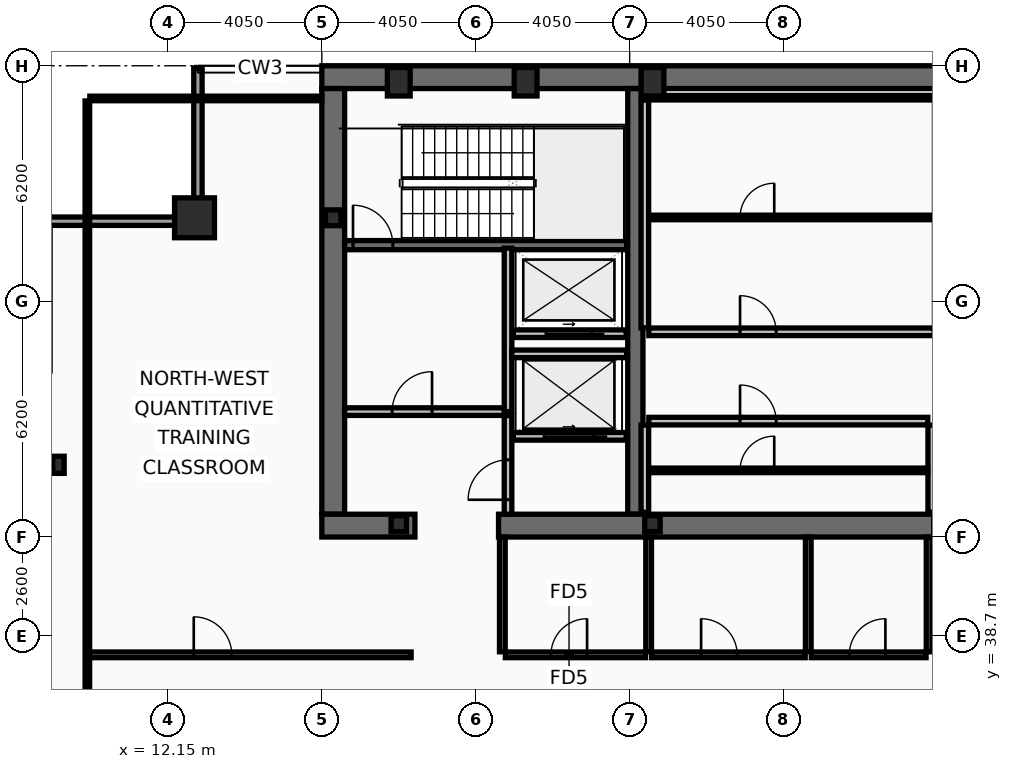
"""IFC4 building model, lengths in metres.
Left out: names, types, materials, properties, quantities, classifications, styles, units other than length and angle.
Written with IfcOpenShell. Run it as: python <this file> out.ifc"""

import sys

from ifc_helpers import new_model, si_unit, direction, frame, frame_2d, origin, origin_2d, place, context, subcontext, project, spatial, rectangle, hollow_rectangle, i_section, extrude, element, fill, save


model = new_model("IFC4")
c1 = context("Model", 3, precision=1e-05, world=origin(), true_north=direction((0.0, 1.0)))
c2 = subcontext(c1, "Body", "Model", "MODEL_VIEW")
j1 = project(units=[si_unit("LENGTHUNIT", "METRE"), si_unit("PLANEANGLEUNIT", "RADIAN")], contexts=[c1])
p1 = place(None, origin())
s1 = spatial("IfcSite", under=j1, at=p1, CompositionType="ELEMENT")
p2 = place(p1, origin())
s2 = spatial("IfcBuilding", under=s1, at=p2, CompositionType="ELEMENT")
p3 = place(p2, frame((0.0, 0.0, 265.4)))
s3 = spatial("IfcBuildingStorey", under=s2, at=p3, CompositionType="ELEMENT", Elevation=265.4)
p4 = place(p3, frame((16.2, 53.4, 0.0), z_axis=(0.0, 0.0, 1.0), x_axis=(1.0, 0.0, 0.0)))
e1 = element("IfcWall", 1, at=p4, inside=s3, PredefinedType="SHEAR", context=c2, shape_type="SweptSolid", body=[
    extrude(rectangle(XDim=40.5, YDim=0.6, at=frame_2d((20.25, 0.0))), origin(), (0.0, 0.0, 1.0), 4.24),
])
p5 = place(p3, frame((16.5, 41.9, 0.0), z_axis=(0.0, 0.0, 1.0), x_axis=(0.0, 1.0, 0.0)))
e2 = element("IfcWall", 2, at=p5, inside=s3, PredefinedType="SHEAR", context=c2, shape_type="SweptSolid", body=[
    extrude(rectangle(XDim=11.2, YDim=0.6, at=frame_2d((5.6, 0.0))), origin(), (0.0, 0.0, 1.0), 4.24),
])
p6 = place(p3, frame((24.45, 41.9, 0.0), z_axis=(0.0, 0.0, 1.0), x_axis=(0.0, 1.0, 0.0)))
e3 = element("IfcWall", 3, at=p6, inside=s3, PredefinedType="SHEAR", context=c2, shape_type="SweptSolid", body=[
    extrude(rectangle(XDim=11.2, YDim=0.4, at=frame_2d((5.6, 0.0))), origin(), (0.0, 0.0, 1.0), 4.24),
])
p7 = place(p3, frame((18.65, 41.6, 0.0), z_axis=(0.0, 0.0, 1.0), x_axis=(-1.0, 0.0, 0.0)))
e4 = element("IfcWall", 4, at=p7, inside=s3, PredefinedType="SHEAR", context=c2, shape_type="SweptSolid", body=[
    extrude(rectangle(XDim=2.45, YDim=0.6, at=frame_2d((1.225, 0.0))), origin(), (0.0, 0.0, 1.0), 4.24),
])
p8 = place(p3, frame((32.3, 41.6, 0.0), z_axis=(0.0, 0.0, 1.0), x_axis=(-1.0, 0.0, 0.0)))
e5 = element("IfcWall", 5, at=p8, inside=s3, PredefinedType="SHEAR", context=c2, shape_type="SweptSolid", body=[
    extrude(rectangle(XDim=11.45, YDim=0.6, at=frame_2d((5.725, 0.0))), origin(), (0.0, 0.0, 1.0), 4.24),
])
p9 = place(p3, frame((16.8, 48.98, 0.0), z_axis=(0.0, 0.0, 1.0), x_axis=(1.0, 0.0, 0.0)))
e6 = element("IfcWall", 6, at=p9, inside=s3, PredefinedType="SHEAR", context=c2, shape_type="SweptSolid", body=[
    extrude(rectangle(XDim=7.42, YDim=0.24, at=frame_2d((3.71, 0.0))), origin(), (0.0, 0.0, 1.0), 4.24),
])
p10 = place(p9, frame((0.22, 0.0, 0.0)))
e7 = element("IfcOpeningElement", 7, at=p10, cuts=e6, PredefinedType="OPENING", context=c2, shape_type="SweptSolid", body=[
    extrude(rectangle(XDim=1.05, YDim=2.15, at=frame_2d((0.525, 1.075))), frame((0.0, 0.13, 0.0), z_axis=(0.0, -1.0, 0.0), x_axis=(1.0, 0.0, 0.0)), (0.0, 0.0, 1.0), 0.26),
])
p11 = place(p3, frame((12.85, 49.7, 0.0), z_axis=(0.0, 0.0, 1.0), x_axis=(1.0, 0.0, 0.0)))
e8 = element("IfcColumn", 8, at=p11, inside=s3, PredefinedType="COLUMN", context=c2, shape_type="SweptSolid", body=[
    extrude(hollow_rectangle(XDim=1.05, YDim=1.05, WallThickness=0.055, at=origin_2d()), origin(), (0.0, 0.0, 1.0), 4.4),
])
for number, where, z_axis, x_axis in (
    (9, (18.225, 53.28, 0.0), (0.0, 0.0, 1.0), (1.0, 0.0, 0.0)),
    (10, (21.562, 53.28, 0.0), (0.0, 0.0, 1.0), (1.0, 0.0, 0.0)),
    (11, (24.9, 53.28, 0.0), (0.0, 0.0, 1.0), (1.0, 0.0, 0.0)),
):
    element("IfcColumn", number, at=place(p3, frame(where, z_axis=z_axis, x_axis=x_axis)), inside=s3, PredefinedType="COLUMN", context=c2, shape_type="SweptSolid", body=[
        extrude(hollow_rectangle(XDim=0.6, YDim=0.75, WallThickness=0.045, at=origin_2d()), origin(), (0.0, 0.0, 1.0), 4.4),
    ])
p12 = place(p3, frame((9.27, 43.2, 0.0), z_axis=(0.0, 0.0, 1.0), x_axis=(1.0, 0.0, 0.0)))
e12 = element("IfcColumn", 12, at=p12, inside=s3, PredefinedType="COLUMN", context=c2, shape_type="SweptSolid", body=[
    extrude(i_section(OverallWidth=0.3, OverallDepth=0.45, WebThickness=0.014, FlangeThickness=0.026, at=origin_2d()), origin(), (0.0, 0.0, 1.0), 4.4),
])
for number, where, z_axis, x_axis in (
    (13, (16.5, 49.7, 0.0), (0.0, 0.0, 1.0), (1.0, 0.0, 0.0)),
    (14, (18.225, 41.65, 0.0), (0.0, 0.0, 1.0), (1.0, 0.0, 0.0)),
    (15, (24.9, 41.65, 0.0), (0.0, 0.0, 1.0), (1.0, 0.0, 0.0)),
):
    element("IfcColumn", number, at=place(p3, frame(where, z_axis=z_axis, x_axis=x_axis)), inside=s3, PredefinedType="COLUMN", context=c2, shape_type="SweptSolid", body=[
        extrude(i_section(OverallWidth=0.406, OverallDepth=0.416, WebThickness=0.03, FlangeThickness=0.048, at=origin_2d()), origin(), (0.0, 0.0, 1.0), 4.4),
    ])
p13 = place(p3, frame((8.83, 49.61, 0.0), z_axis=(0.0, 0.0, 1.0), x_axis=(1.0, 0.0, 0.0)))
e16 = element("IfcWall", 16, at=p13, inside=s3, PredefinedType="SOLIDWALL", context=c2, shape_type="SweptSolid", body=[
    extrude(rectangle(XDim=4.22, YDim=0.22, at=frame_2d((2.11, 0.0))), origin(), (0.0, 0.0, 1.0), 3.68),
])
p14 = place(p3, frame((12.94, 49.72, 0.0), z_axis=(0.0, 0.0, 1.0), x_axis=(0.0, 1.0, 0.0)))
e17 = element("IfcWall", 17, at=p14, inside=s3, PredefinedType="SOLIDWALL", context=c2, shape_type="SweptSolid", body=[
    extrude(rectangle(XDim=3.91, YDim=0.22, at=frame_2d((1.955, 0.0))), origin(), (0.0, 0.0, 1.0), 3.68),
])
p15 = place(p3, frame((24.21, 43.95, 0.0), z_axis=(0.0, 0.0, 1.0), x_axis=(-1.0, 0.0, 0.0)))
e18 = element("IfcWall", 18, at=p15, inside=s3, PredefinedType="PARTITIONING", context=c2, shape_type="SweptSolid", body=[
    extrude(rectangle(XDim=2.97, YDim=0.2, at=frame_2d((1.485, 0.0))), origin(), (0.0, 0.0, 1.0), 4.24),
])
p16 = place(p15, frame((0.86, 0.0, 0.0)))
e19 = element("IfcOpeningElement", 19, at=p16, cuts=e18, PredefinedType="OPENING", context=c2, shape_type="SweptSolid", body=[
    extrude(rectangle(XDim=1.3, YDim=2.18, at=frame_2d((0.65, 1.09))), frame((0.0, 0.11, 0.0), z_axis=(0.0, -1.0, 0.0), x_axis=(1.0, 0.0, 0.0)), (0.0, 0.0, 1.0), 0.22),
])
p17 = place(p3, frame((24.21, 46.65, 0.0), z_axis=(0.0, 0.0, 1.0), x_axis=(-1.0, 0.0, 0.0)))
e20 = element("IfcWall", 20, at=p17, inside=s3, PredefinedType="PARTITIONING", context=c2, shape_type="SweptSolid", body=[
    extrude(rectangle(XDim=2.97, YDim=0.2, at=frame_2d((1.485, 0.0))), origin(), (0.0, 0.0, 1.0), 4.24),
])
p18 = place(p17, frame((0.91, 0.0, 0.0)))
e21 = element("IfcOpeningElement", 21, at=p18, cuts=e20, PredefinedType="OPENING", context=c2, shape_type="SweptSolid", body=[
    extrude(rectangle(XDim=1.2, YDim=2.18, at=frame_2d((0.6, 1.09))), frame((0.0, 0.11, 0.0), z_axis=(0.0, -1.0, 0.0), x_axis=(1.0, 0.0, 0.0)), (0.0, 0.0, 1.0), 0.22),
])
p19 = place(p3, frame((21.1, 44.6, 0.0), z_axis=(0.0, 0.0, 1.0), x_axis=(0.0, 1.0, 0.0)))
e22 = element("IfcWall", 22, at=p19, inside=s3, PredefinedType="PARTITIONING", context=c2, shape_type="SweptSolid", body=[
    extrude(rectangle(XDim=4.3, YDim=0.2, at=frame_2d((2.15, 0.0))), origin(), (0.0, 0.0, 1.0), 4.24),
])
p20 = place(p3, frame((16.8, 44.6, 0.0), z_axis=(0.0, 0.0, 1.0), x_axis=(1.0, 0.0, 0.0)))
e23 = element("IfcWall", 23, at=p20, inside=s3, PredefinedType="PARTITIONING", context=c2, shape_type="SweptSolid", body=[
    extrude(rectangle(XDim=4.2, YDim=0.2, at=frame_2d((2.1, 0.0))), origin(), (0.0, 0.0, 1.0), 4.24),
])
p21 = place(p20, frame((1.25, 0.0, 0.0)))
e24 = element("IfcOpeningElement", 24, at=p21, cuts=e23, PredefinedType="OPENING", context=c2, shape_type="SweptSolid", body=[
    extrude(rectangle(XDim=1.05, YDim=2.15, at=frame_2d((0.525, 1.075))), frame((0.0, 0.11, 0.0), z_axis=(0.0, -1.0, 0.0), x_axis=(1.0, 0.0, 0.0)), (0.0, 0.0, 1.0), 0.22),
])
p22 = place(p3, frame((21.2, 46.12, 0.0), z_axis=(0.0, 0.0, 1.0), x_axis=(1.0, 0.0, 0.0)))
e25 = element("IfcWall", 25, at=p22, inside=s3, PredefinedType="PARTITIONING", context=c2, shape_type="SweptSolid", body=[
    extrude(rectangle(XDim=3.02, YDim=0.2, at=frame_2d((1.51, 0.0))), origin(), (0.0, 0.0, 1.0), 4.24),
])
p23 = place(p3, frame((21.1, 41.9, 0.0), z_axis=(0.0, 0.0, 1.0), x_axis=(0.0, 1.0, 0.0)))
e26 = element("IfcWall", 26, at=p23, inside=s3, PredefinedType="PARTITIONING", context=c2, shape_type="SweptSolid", body=[
    extrude(rectangle(XDim=2.595, YDim=0.2, at=frame_2d((1.298, 0.0))), origin(), (0.0, 0.0, 1.0), 4.24),
])
p24 = place(p23, frame((0.38, 0.0, 0.0)))
e27 = element("IfcOpeningElement", 27, at=p24, cuts=e26, PredefinedType="OPENING", context=c2, shape_type="SweptSolid", body=[
    extrude(rectangle(XDim=1.05, YDim=2.15, at=frame_2d((0.525, 1.075))), frame((0.0, 0.11, 0.0), z_axis=(0.0, -1.0, 0.0), x_axis=(1.0, 0.0, 0.0)), (0.0, 0.0, 1.0), 0.22),
])
p25 = place(p3, frame((24.7, 46.805, 0.0), z_axis=(0.0, 0.0, 1.0), x_axis=(0.0, 1.0, 0.0)))
e28 = element("IfcWall", 28, at=p25, inside=s3, PredefinedType="PARTITIONING", context=c2, shape_type="SweptSolid", body=[
    extrude(rectangle(XDim=5.99, YDim=0.2, at=frame_2d((2.995, 0.0))), origin(), (0.0, 0.0, 1.0), 4.24),
])
p26 = place(p3, frame((24.805, 52.86, 0.0), z_axis=(0.0, 0.0, 1.0), x_axis=(1.0, 0.0, 0.0)))
e29 = element("IfcWall", 29, at=p26, inside=s3, PredefinedType="PARTITIONING", context=c2, shape_type="SweptSolid", body=[
    extrude(rectangle(XDim=7.51, YDim=0.12, at=frame_2d((3.755, 0.0))), origin(), (0.0, 0.0, 1.0), 4.24),
])
p27 = place(p3, frame((24.805, 49.709, 0.0), z_axis=(0.0, 0.0, 1.0), x_axis=(1.0, 0.0, 0.0)))
e30 = element("IfcWall", 30, at=p27, inside=s3, PredefinedType="PARTITIONING", context=c2, shape_type="SweptSolid", body=[
    extrude(rectangle(XDim=7.51, YDim=0.12, at=frame_2d((3.755, 0.0))), origin(), (0.0, 0.0, 1.0), 4.24),
])
p28 = place(p27, frame((2.4, 0.0, 0.0)))
e31 = element("IfcOpeningElement", 31, at=p28, cuts=e30, PredefinedType="OPENING", context=c2, shape_type="SweptSolid", body=[
    extrude(rectangle(XDim=0.9, YDim=2.05, at=frame_2d((0.45, 1.025))), frame((0.0, 0.07, 0.0), z_axis=(0.0, -1.0, 0.0), x_axis=(1.0, 0.0, 0.0)), (0.0, 0.0, 1.0), 0.14),
])
p29 = place(p3, frame((24.805, 46.7, 0.0), z_axis=(0.0, 0.0, 1.0), x_axis=(1.0, 0.0, 0.0)))
e32 = element("IfcWall", 32, at=p29, inside=s3, PredefinedType="PARTITIONING", context=c2, shape_type="SweptSolid", body=[
    extrude(rectangle(XDim=7.51, YDim=0.2, at=frame_2d((3.755, 0.0))), origin(), (0.0, 0.0, 1.0), 4.24),
])
p30 = place(p29, frame((2.4, 0.0, 0.0)))
e33 = element("IfcOpeningElement", 33, at=p30, cuts=e32, PredefinedType="OPENING", context=c2, shape_type="SweptSolid", body=[
    extrude(rectangle(XDim=0.95, YDim=2.1, at=frame_2d((0.475, 1.05))), frame((0.0, 0.11, 0.0), z_axis=(0.0, -1.0, 0.0), x_axis=(1.0, 0.0, 0.0)), (0.0, 0.0, 1.0), 0.22),
])
for number, where, z_axis, x_axis in (
    (34, (24.7, 41.95, 0.0), (0.0, 0.0, 1.0), (0.0, 1.0, 0.0)),
    (35, (32.25, 41.95, 0.0), (0.0, 0.0, 1.0), (0.0, 1.0, 0.0)),
):
    element("IfcWall", number, at=place(p3, frame(where, z_axis=z_axis, x_axis=x_axis)), inside=s3, PredefinedType="PARTITIONING", context=c2, shape_type="SweptSolid", body=[
        extrude(rectangle(XDim=2.295, YDim=0.2, at=frame_2d((1.147, 0.0))), origin(), (0.0, 0.0, 1.0), 4.24),
    ])
p31 = place(p3, frame((24.805, 43.054, 0.0), z_axis=(0.0, 0.0, 1.0), x_axis=(1.0, 0.0, 0.0)))
e36 = element("IfcWall", 36, at=p31, inside=s3, PredefinedType="PARTITIONING", context=c2, shape_type="SweptSolid", body=[
    extrude(rectangle(XDim=7.34, YDim=0.12, at=frame_2d((3.67, 0.0))), origin(), (0.0, 0.0, 1.0), 4.24),
])
p32 = place(p31, frame((2.4, 0.0, 0.0)))
e37 = element("IfcOpeningElement", 37, at=p32, cuts=e36, PredefinedType="OPENING", context=c2, shape_type="SweptSolid", body=[
    extrude(rectangle(XDim=0.9, YDim=2.05, at=frame_2d((0.45, 1.025))), frame((0.0, 0.07, 0.0), z_axis=(0.0, -1.0, 0.0), x_axis=(1.0, 0.0, 0.0)), (0.0, 0.0, 1.0), 0.14),
])
p33 = place(p3, frame((24.805, 44.35, 0.0), z_axis=(0.0, 0.0, 1.0), x_axis=(1.0, 0.0, 0.0)))
e38 = element("IfcWall", 38, at=p33, inside=s3, PredefinedType="PARTITIONING", context=c2, shape_type="SweptSolid", body=[
    extrude(rectangle(XDim=7.34, YDim=0.2, at=frame_2d((3.67, 0.0))), origin(), (0.0, 0.0, 1.0), 4.24),
])
p34 = place(p33, frame((2.4, 0.0, 0.0)))
e39 = element("IfcOpeningElement", 39, at=p34, cuts=e38, PredefinedType="OPENING", context=c2, shape_type="SweptSolid", body=[
    extrude(rectangle(XDim=0.95, YDim=2.1, at=frame_2d((0.475, 1.05))), frame((0.0, 0.11, 0.0), z_axis=(0.0, -1.0, 0.0), x_axis=(1.0, 0.0, 0.0)), (0.0, 0.0, 1.0), 0.22),
])
p35 = place(p3, frame((21.03, 38.2, 0.0), z_axis=(0.0, 0.0, 1.0), x_axis=(1.0, 0.0, 0.0)))
e40 = element("IfcWall", 40, at=p35, inside=s3, PredefinedType="PARTITIONING", context=c2, shape_type="SweptSolid", body=[
    extrude(rectangle(XDim=3.69, YDim=0.15, at=frame_2d((1.845, 0.0))), origin(), (0.0, 0.0, 1.0), 3.58),
])
p36 = place(p35, frame((1.2, 0.0, 0.0)))
e41 = element("IfcOpeningElement", 41, at=p36, cuts=e40, PredefinedType="OPENING", context=c2, shape_type="SweptSolid", body=[
    extrude(rectangle(XDim=0.95, YDim=2.05, at=frame_2d((0.475, 1.025))), frame((0.0, 0.085, 0.0), z_axis=(0.0, -1.0, 0.0), x_axis=(1.0, 0.0, 0.0)), (0.0, 0.0, 1.0), 0.17),
])
p37 = place(p3, frame((24.88, 38.2, 0.0), z_axis=(0.0, 0.0, 1.0), x_axis=(1.0, 0.0, 0.0)))
e42 = element("IfcWall", 42, at=p37, inside=s3, PredefinedType="PARTITIONING", context=c2, shape_type="SweptSolid", body=[
    extrude(rectangle(XDim=4.04, YDim=0.15, at=frame_2d((2.02, 0.0))), origin(), (0.0, 0.0, 1.0), 3.58),
])
p38 = place(p37, frame((1.3, 0.0, 0.0)))
e43 = element("IfcOpeningElement", 43, at=p38, cuts=e42, PredefinedType="OPENING", context=c2, shape_type="SweptSolid", body=[
    extrude(rectangle(XDim=0.95, YDim=2.05, at=frame_2d((0.475, 1.025))), frame((0.0, 0.085, 0.0), z_axis=(0.0, -1.0, 0.0), x_axis=(1.0, 0.0, 0.0)), (0.0, 0.0, 1.0), 0.17),
])
p39 = place(p3, frame((29.08, 38.2, 0.0), z_axis=(0.0, 0.0, 1.0), x_axis=(1.0, 0.0, 0.0)))
e44 = element("IfcWall", 44, at=p39, inside=s3, PredefinedType="PARTITIONING", context=c2, shape_type="SweptSolid", body=[
    extrude(rectangle(XDim=3.02, YDim=0.15, at=frame_2d((1.51, 0.0))), origin(), (0.0, 0.0, 1.0), 3.58),
])
p40 = place(p39, frame((1.0, 0.0, 0.0)))
e45 = element("IfcOpeningElement", 45, at=p40, cuts=e44, PredefinedType="OPENING", context=c2, shape_type="SweptSolid", body=[
    extrude(rectangle(XDim=0.95, YDim=2.05, at=frame_2d((0.475, 1.025))), frame((0.0, 0.085, 0.0), z_axis=(0.0, -1.0, 0.0), x_axis=(1.0, 0.0, 0.0)), (0.0, 0.0, 1.0), 0.17),
])
p41 = place(p3, frame((20.95, 38.28, 0.0), z_axis=(0.0, 0.0, 1.0), x_axis=(0.0, 1.0, 0.0)))
e46 = element("IfcWall", 46, at=p41, inside=s3, PredefinedType="PARTITIONING", context=c2, shape_type="SweptSolid", body=[
    extrude(rectangle(XDim=3.02, YDim=0.15, at=frame_2d((1.51, 0.0))), origin(), (0.0, 0.0, 1.0), 4.24),
])
p42 = place(p3, frame((24.8, 38.28, 0.0), z_axis=(0.0, 0.0, 1.0), x_axis=(0.0, 1.0, 0.0)))
e47 = element("IfcWall", 47, at=p42, inside=s3, PredefinedType="PARTITIONING", context=c2, shape_type="SweptSolid", body=[
    extrude(rectangle(XDim=3.02, YDim=0.15, at=frame_2d((1.51, 0.0))), origin(), (0.0, 0.0, 1.0), 3.58),
])
for number, where, z_axis, x_axis in (
    (48, (29.0, 38.28, 0.0), (0.0, 0.0, 1.0), (0.0, 1.0, 0.0)),
    (49, (32.18, 38.28, 0.0), (0.0, 0.0, 1.0), (0.0, 1.0, 0.0)),
):
    element("IfcWall", number, at=place(p3, frame(where, z_axis=z_axis, x_axis=x_axis)), inside=s3, PredefinedType="PARTITIONING", context=c2, shape_type="SweptSolid", body=[
        extrude(rectangle(XDim=3.02, YDim=0.15, at=frame_2d((1.51, 0.0))), origin(), (0.0, 0.0, 1.0), 4.24),
    ])
p43 = place(p3, frame((10.03, 38.2, 0.0), z_axis=(0.0, 0.0, 1.0), x_axis=(1.0, 0.0, 0.0)))
e50 = element("IfcWall", 50, at=p43, inside=s3, PredefinedType="PARTITIONING", context=c2, shape_type="SweptSolid", body=[
    extrude(rectangle(XDim=8.52, YDim=0.15, at=frame_2d((4.26, 0.0))), origin(), (0.0, 0.0, 1.0), 3.58),
])
p44 = place(p43, frame((2.8, 0.0, 0.0)))
e51 = element("IfcOpeningElement", 51, at=p44, cuts=e50, PredefinedType="OPENING", context=c2, shape_type="SweptSolid", body=[
    extrude(rectangle(XDim=1.0, YDim=2.05, at=frame_2d((0.5, 1.025))), frame((0.0, 0.085, 0.0), z_axis=(0.0, -1.0, 0.0), x_axis=(1.0, 0.0, 0.0)), (0.0, 0.0, 1.0), 0.17),
])
p45 = place(p3, frame((10.03, 10.665, 0.0), z_axis=(0.0, 0.0, 1.0), x_axis=(0.0, 1.0, 0.0)))
e52 = element("IfcWall", 52, at=p45, inside=s3, PredefinedType="PARTITIONING", context=c2, shape_type="SweptSolid", body=[
    extrude(rectangle(XDim=42.11, YDim=0.12, at=frame_2d((21.055, 0.0))), origin(), (0.0, 0.0, 1.0), 3.58),
])
p46 = place(p3, frame((10.095, 52.84, 0.0), z_axis=(0.0, 0.0, 1.0), x_axis=(1.0, 0.0, 0.0)))
e53 = element("IfcWall", 53, at=p46, inside=s3, PredefinedType="PARTITIONING", context=c2, shape_type="SweptSolid", body=[
    extrude(rectangle(XDim=6.105, YDim=0.12, at=frame_2d((3.052, 0.0))), origin(), (0.0, 0.0, 1.0), 4.24),
])
p47 = place(p10, origin())
e54 = element("IfcDoor", 54, at=p47, inside=s3, OperationType="SINGLE_SWING_LEFT", PredefinedType="DOOR", context=c2, shape_type="SweptSolid", body=[
    extrude(rectangle(XDim=1.05, YDim=2.15, at=frame_2d((0.525, 1.075))), frame((0.0, 0.025, 0.0), z_axis=(0.0, -1.0, 0.0), x_axis=(1.0, 0.0, 0.0)), (0.0, 0.0, 1.0), 0.05),
])
fill(e7, e54)
p48 = place(p16, origin())
e55 = element("IfcDoor", 55, at=p48, inside=s3, OperationType="SLIDING_TO_LEFT", PredefinedType="DOOR", context=c2, shape_type="SweptSolid", body=[
    extrude(rectangle(XDim=1.3, YDim=2.18, at=frame_2d((0.65, 1.09))), frame((0.0, 0.025, 0.0), z_axis=(0.0, -1.0, 0.0), x_axis=(1.0, 0.0, 0.0)), (0.0, 0.0, 1.0), 0.05),
])
fill(e19, e55)
p49 = place(p18, origin())
e56 = element("IfcDoor", 56, at=p49, inside=s3, OperationType="SLIDING_TO_LEFT", PredefinedType="DOOR", context=c2, shape_type="SweptSolid", body=[
    extrude(rectangle(XDim=1.2, YDim=2.18, at=frame_2d((0.6, 1.09))), frame((0.0, 0.025, 0.0), z_axis=(0.0, -1.0, 0.0), x_axis=(1.0, 0.0, 0.0)), (0.0, 0.0, 1.0), 0.05),
])
fill(e21, e56)
p50 = place(p21, origin())
e57 = element("IfcDoor", 57, at=p50, inside=s3, OperationType="SINGLE_SWING_RIGHT", PredefinedType="DOOR", context=c2, shape_type="SweptSolid", body=[
    extrude(rectangle(XDim=1.05, YDim=2.15, at=frame_2d((0.525, 1.075))), frame((0.0, 0.025, 0.0), z_axis=(0.0, -1.0, 0.0), x_axis=(1.0, 0.0, 0.0)), (0.0, 0.0, 1.0), 0.05),
])
fill(e24, e57)
p51 = place(p24, origin())
e58 = element("IfcDoor", 58, at=p51, inside=s3, OperationType="SINGLE_SWING_LEFT", PredefinedType="DOOR", context=c2, shape_type="SweptSolid", body=[
    extrude(rectangle(XDim=1.05, YDim=2.15, at=frame_2d((0.525, 1.075))), frame((0.0, 0.025, 0.0), z_axis=(0.0, -1.0, 0.0), x_axis=(1.0, 0.0, 0.0)), (0.0, 0.0, 1.0), 0.05),
])
fill(e27, e58)
p52 = place(p28, origin())
e59 = element("IfcDoor", 59, at=p52, inside=s3, OperationType="SINGLE_SWING_RIGHT", PredefinedType="DOOR", context=c2, shape_type="SweptSolid", body=[
    extrude(rectangle(XDim=0.9, YDim=2.05, at=frame_2d((0.45, 1.025))), frame((0.0, 0.025, 0.0), z_axis=(0.0, -1.0, 0.0), x_axis=(1.0, 0.0, 0.0)), (0.0, 0.0, 1.0), 0.05),
])
fill(e31, e59)
p53 = place(p30, origin())
e60 = element("IfcDoor", 60, at=p53, inside=s3, OperationType="SINGLE_SWING_LEFT", PredefinedType="DOOR", context=c2, shape_type="SweptSolid", body=[
    extrude(rectangle(XDim=0.95, YDim=2.1, at=frame_2d((0.475, 1.05))), frame((0.0, 0.025, 0.0), z_axis=(0.0, -1.0, 0.0), x_axis=(1.0, 0.0, 0.0)), (0.0, 0.0, 1.0), 0.05),
])
fill(e33, e60)
p54 = place(p32, origin())
e61 = element("IfcDoor", 61, at=p54, inside=s3, OperationType="SINGLE_SWING_RIGHT", PredefinedType="DOOR", context=c2, shape_type="SweptSolid", body=[
    extrude(rectangle(XDim=0.9, YDim=2.05, at=frame_2d((0.45, 1.025))), frame((0.0, 0.025, 0.0), z_axis=(0.0, -1.0, 0.0), x_axis=(1.0, 0.0, 0.0)), (0.0, 0.0, 1.0), 0.05),
])
fill(e37, e61)
p55 = place(p34, origin())
e62 = element("IfcDoor", 62, at=p55, inside=s3, OperationType="SINGLE_SWING_LEFT", PredefinedType="DOOR", context=c2, shape_type="SweptSolid", body=[
    extrude(rectangle(XDim=0.95, YDim=2.1, at=frame_2d((0.475, 1.05))), frame((0.0, 0.025, 0.0), z_axis=(0.0, -1.0, 0.0), x_axis=(1.0, 0.0, 0.0)), (0.0, 0.0, 1.0), 0.05),
])
fill(e39, e62)
p56 = place(p36, origin())
e63 = element("IfcDoor", 63, at=p56, inside=s3, OperationType="SINGLE_SWING_RIGHT", PredefinedType="DOOR", context=c2, shape_type="SweptSolid", body=[
    extrude(rectangle(XDim=0.95, YDim=2.05, at=frame_2d((0.475, 1.025))), frame((0.0, 0.025, 0.0), z_axis=(0.0, -1.0, 0.0), x_axis=(1.0, 0.0, 0.0)), (0.0, 0.0, 1.0), 0.05),
])
fill(e41, e63)
p57 = place(p38, origin())
e64 = element("IfcDoor", 64, at=p57, inside=s3, OperationType="SINGLE_SWING_LEFT", PredefinedType="DOOR", context=c2, shape_type="SweptSolid", body=[
    extrude(rectangle(XDim=0.95, YDim=2.05, at=frame_2d((0.475, 1.025))), frame((0.0, 0.025, 0.0), z_axis=(0.0, -1.0, 0.0), x_axis=(1.0, 0.0, 0.0)), (0.0, 0.0, 1.0), 0.05),
])
fill(e43, e64)
p58 = place(p40, origin())
e65 = element("IfcDoor", 65, at=p58, inside=s3, OperationType="SINGLE_SWING_RIGHT", PredefinedType="DOOR", context=c2, shape_type="SweptSolid", body=[
    extrude(rectangle(XDim=0.95, YDim=2.05, at=frame_2d((0.475, 1.025))), frame((0.0, 0.025, 0.0), z_axis=(0.0, -1.0, 0.0), x_axis=(1.0, 0.0, 0.0)), (0.0, 0.0, 1.0), 0.05),
])
fill(e45, e65)
p59 = place(p44, origin())
e66 = element("IfcDoor", 66, at=p59, inside=s3, OperationType="SINGLE_SWING_LEFT", PredefinedType="DOOR", context=c2, shape_type="SweptSolid", body=[
    extrude(rectangle(XDim=1.0, YDim=2.05, at=frame_2d((0.5, 1.025))), frame((0.0, 0.025, 0.0), z_axis=(0.0, -1.0, 0.0), x_axis=(1.0, 0.0, 0.0)), (0.0, 0.0, 1.0), 0.05),
])
fill(e51, e66)
save(model, sys.argv[1])
